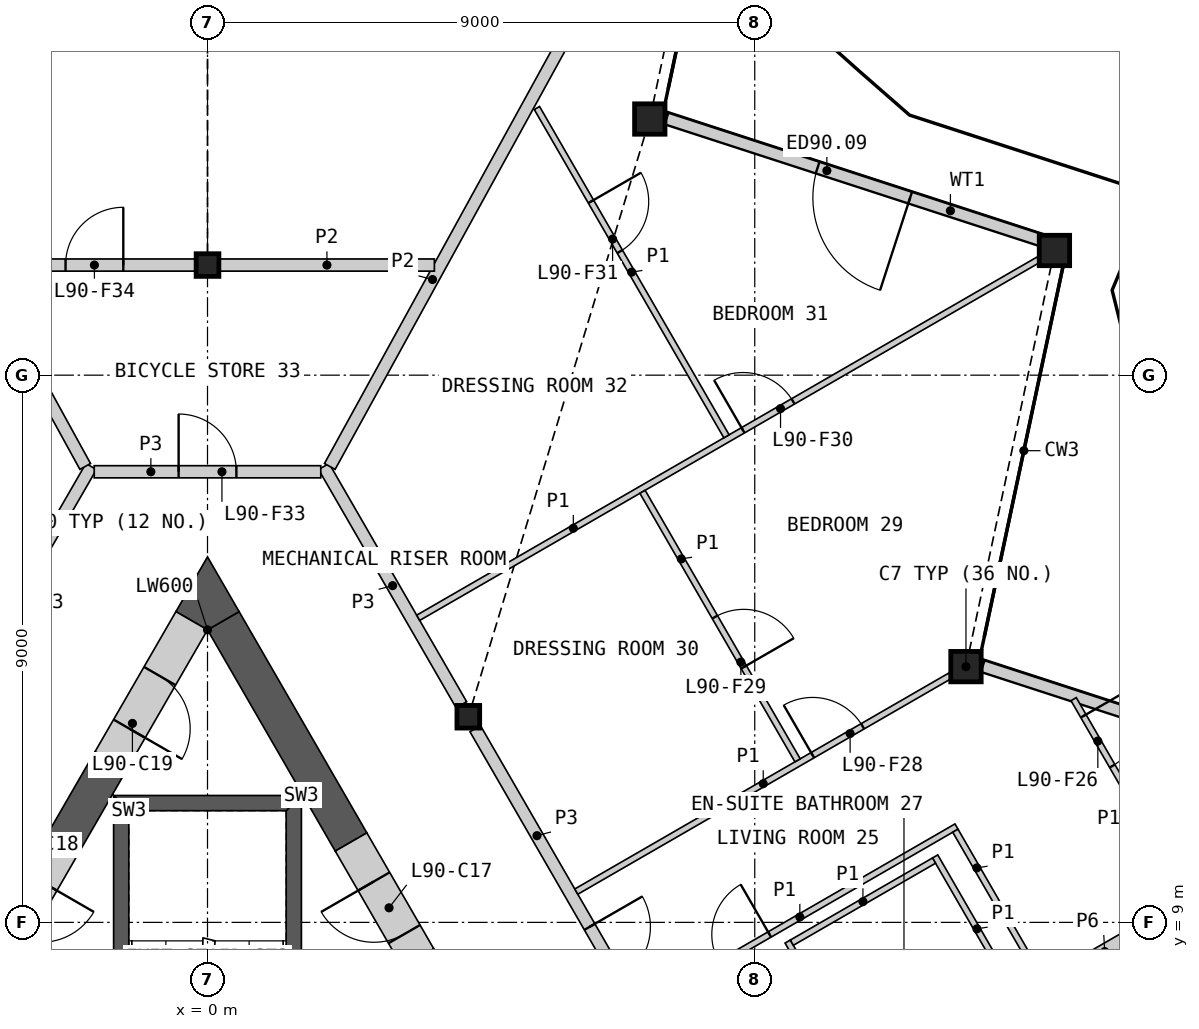
"""IFC4 building model, lengths in metres.
Left out: names, types, materials, properties, quantities, classifications, styles, units other than length and angle.
Written with IfcOpenShell. Run it as: python <this file> out.ifc"""

import sys

from ifc_helpers import new_model, si_unit, direction, frame, frame_2d, origin, origin_2d, place, context, subcontext, project, spatial, polyline, rectangle, hollow_rectangle, i_section, outline, extrude, element, fill, save


model = new_model("IFC4")
c1 = context("Model", 3, precision=1e-05, world=origin(), true_north=direction((0.0, 1.0)))
c2 = subcontext(c1, "Body", "Model", "MODEL_VIEW")
j1 = project(units=[si_unit("LENGTHUNIT", "METRE"), si_unit("PLANEANGLEUNIT", "RADIAN")], contexts=[c1])
p1 = place(None, origin())
s1 = spatial("IfcSite", under=j1, at=p1, CompositionType="ELEMENT")
p2 = place(p1, origin())
s2 = spatial("IfcBuilding", under=s1, at=p2, CompositionType="ELEMENT")
p3 = place(p2, frame((0.0, 0.0, 395.0)))
s3 = spatial("IfcBuildingStorey", under=s2, at=p3, CompositionType="ELEMENT", Elevation=395.0)
for number, where, z_axis, x_axis in (
    (1, (12.474, 13.206, 0.0), (0.0, 0.0, 1.0), (1.0, 0.0, 0.0)),
    (2, (13.929, 20.051, 0.0), (0.0, 0.0, 1.0), (1.0, 0.0, 0.0)),
    (3, (7.274, 22.213, 0.0), (0.0, 0.0, 1.0), (1.0, 0.0, 0.0)),
):
    element("IfcColumn", number, at=place(p3, frame(where, z_axis=z_axis, x_axis=x_axis)), inside=s3, PredefinedType="COLUMN", context=c2, shape_type="SweptSolid", body=[
        extrude(hollow_rectangle(XDim=0.5, YDim=0.5, WallThickness=0.03, at=origin_2d()), origin(), (0.0, 0.0, 1.0), 3.4),
    ])
for number, where, z_axis, x_axis in (
    (4, (0.0, 19.811, 0.0), (0.0, 0.0, 1.0), (1.0, 0.0, 0.0)),
    (5, (4.289, 12.382, 0.0), (0.0, 0.0, 1.0), (1.0, 0.0, 0.0)),
):
    element("IfcColumn", number, at=place(p3, frame(where, z_axis=z_axis, x_axis=x_axis)), inside=s3, PredefinedType="COLUMN", context=c2, shape_type="SweptSolid", body=[
        extrude(i_section(OverallWidth=0.374, OverallDepth=0.372, WebThickness=0.016, FlangeThickness=0.026, at=origin_2d()), origin(), (0.0, 0.0, 1.0), 3.4),
    ])
p4 = place(p3, frame((18.974, 11.191, 0.0), z_axis=(0.0, 0.0, 1.0), x_axis=(-0.951057912068, 0.309012698595, 0.0)))
e6 = element("IfcWall", 6, at=p4, inside=s3, PredefinedType="SOLIDWALL", context=c2, shape_type="SweptSolid", body=[
    extrude(rectangle(XDim=6.546, YDim=0.2, at=frame_2d((3.273, 0.0))), origin(), (0.0, 0.0, 1.0), 2.634),
])
p5 = place(p4, frame((2.333, 0.0, 0.0)))
e7 = element("IfcOpeningElement", 7, at=p5, cuts=e6, PredefinedType="OPENING", context=c2, shape_type="SweptSolid", body=[
    extrude(rectangle(XDim=1.6, YDim=2.25, at=frame_2d((0.8, 1.125))), frame((0.0, 0.11, 0.0), z_axis=(0.0, -1.0, 0.0), x_axis=(1.0, 0.0, 0.0)), (0.0, 0.0, 1.0), 0.22),
])
p6 = place(p3, frame((13.774, 20.198, 0.0), z_axis=(0.0, 0.0, 1.0), x_axis=(-0.951046950169, 0.309046434335, 0.0)))
e8 = element("IfcWall", 8, at=p6, inside=s3, PredefinedType="SOLIDWALL", context=c2, shape_type="SweptSolid", body=[
    extrude(rectangle(XDim=6.546, YDim=0.2, at=frame_2d((3.273, 0.0))), origin(), (0.0, 0.0, 1.0), 2.634),
])
p7 = place(p6, frame((2.333, 0.0, 0.0)))
e9 = element("IfcOpeningElement", 9, at=p7, cuts=e8, PredefinedType="OPENING", context=c2, shape_type="SweptSolid", body=[
    extrude(rectangle(XDim=1.6, YDim=2.25, at=frame_2d((0.8, 1.125))), frame((0.0, 0.11, 0.0), z_axis=(0.0, -1.0, 0.0), x_axis=(1.0, 0.0, 0.0)), (0.0, 0.0, 1.0), 0.22),
])
p8 = place(p3, origin())
e10 = element("IfcWall", 10, at=p8, inside=s3, PredefinedType="SHEAR", context=c2, shape_type="SweptSolid", body=[
    extrude(outline(polyline([(1.544, 5.237), (1.544, 11.087), (1.294, 10.837), (1.294, 5.237), (1.544, 5.237)])), origin(), (0.0, 0.0, 1.0), 3.1),
])
p9 = place(p3, origin())
e11 = element("IfcWall", 11, at=p9, inside=s3, PredefinedType="SHEAR", context=c2, shape_type="SweptSolid", body=[
    extrude(outline(polyline([(1.544, 11.087), (-1.544, 11.087), (-1.294, 10.837), (1.294, 10.837), (1.544, 11.087)])), origin(), (0.0, 0.0, 1.0), 3.1),
])
p10 = place(p3, origin())
e12 = element("IfcWall", 12, at=p10, inside=s3, PredefinedType="SHEAR", context=c2, shape_type="SweptSolid", body=[
    extrude(outline(polyline([(-1.294, 10.837), (-1.544, 11.087), (-1.544, 5.237), (-1.294, 5.237), (-1.294, 10.837)])), origin(), (0.0, 0.0, 1.0), 3.1),
])
p11 = place(p3, frame((8.686, -0.634, 0.0), z_axis=(0.0, 0.0, 1.0), x_axis=(-0.50001836461, 0.866014800712, 0.0)))
e13 = element("IfcWall", 13, at=p11, inside=s3, PredefinedType="SHEAR", context=c2, shape_type="SweptSolid", body=[
    extrude(rectangle(XDim=10.451, YDim=0.6, at=frame_2d((5.225, 0.0))), origin(), (0.0, 0.0, 1.0), 3.1),
])
p12 = place(p3, frame((2.361, 10.322, 0.0), z_axis=(0.0, 0.0, 1.0), x_axis=(-0.500000735859, 0.866024978935, 0.0)))
e14 = element("IfcWall", 14, at=p12, inside=s3, PredefinedType="SHEAR", context=c2, shape_type="SweptSolid", body=[
    extrude(rectangle(XDim=4.202, YDim=0.6, at=frame_2d((2.101, 0.0))), origin(), (0.0, 0.0, 1.0), 3.1),
])
p13 = place(p3, frame((-1.59, 11.658, 0.0), z_axis=(0.0, 0.0, 1.0), x_axis=(-0.500037594623, -0.866003697431, 0.0)))
e15 = element("IfcWall", 15, at=p13, inside=s3, PredefinedType="SHEAR", context=c2, shape_type="SweptSolid", body=[
    extrude(rectangle(XDim=1.542, YDim=0.6, at=frame_2d((0.771, 0.0))), origin(), (0.0, 0.0, 1.0), 3.1),
])
p14 = place(p3, origin())
e16 = element("IfcWall", 16, at=p14, inside=s3, PredefinedType="SHEAR", context=c2, shape_type="SweptSolid", body=[
    extrude(outline(polyline([(0.0, 13.811), (-0.52, 14.111), (0.0, 15.011), (0.52, 14.111), (0.0, 13.811)])), origin(), (0.0, 0.0, 1.0), 3.1),
])
p15 = place(p3, frame((3.461, 8.417, 0.0), z_axis=(0.0, 0.0, 1.0), x_axis=(-0.499946605688, 0.86605622881, 0.0)))
e17 = element("IfcWall", 17, at=p15, inside=s3, PredefinedType="SHEAR", context=c2, shape_type="SweptSolid", body=[
    extrude(rectangle(XDim=2.2, YDim=0.6, at=frame_2d((1.1, 0.0))), origin(), (0.0, 0.0, 1.0), 3.1),
])
p16 = place(p15, frame((0.45, 0.0, 0.0)))
e18 = element("IfcOpeningElement", 18, at=p16, cuts=e17, PredefinedType="OPENING", context=c2, shape_type="SweptSolid", body=[
    extrude(rectangle(XDim=1.0, YDim=2.1, at=frame_2d((0.5, 1.05))), frame((0.0, 0.31, 0.0), z_axis=(0.0, -1.0, 0.0), x_axis=(1.0, 0.0, 0.0)), (0.0, 0.0, 1.0), 0.62),
])
p17 = place(p3, frame((-2.361, 10.322, 0.0), z_axis=(0.0, 0.0, 1.0), x_axis=(-0.499946605688, -0.86605622881, 0.0)))
e19 = element("IfcWall", 19, at=p17, inside=s3, PredefinedType="SHEAR", context=c2, shape_type="SweptSolid", body=[
    extrude(rectangle(XDim=2.2, YDim=0.6, at=frame_2d((1.1, 0.0))), origin(), (0.0, 0.0, 1.0), 3.1),
])
p18 = place(p17, frame((0.75, 0.0, 0.0)))
e20 = element("IfcOpeningElement", 20, at=p18, cuts=e19, PredefinedType="OPENING", context=c2, shape_type="SweptSolid", body=[
    extrude(rectangle(XDim=1.0, YDim=2.1, at=frame_2d((0.5, 1.05))), frame((0.0, 0.31, 0.0), z_axis=(0.0, -1.0, 0.0), x_axis=(1.0, 0.0, 0.0)), (0.0, 0.0, 1.0), 0.62),
])
p19 = place(p3, frame((-0.26, 13.961, 0.0), z_axis=(0.0, 0.0, 1.0), x_axis=(-0.49997936161, -0.866037319036, 0.0)))
e21 = element("IfcWall", 21, at=p19, inside=s3, PredefinedType="SHEAR", context=c2, shape_type="SweptSolid", body=[
    extrude(rectangle(XDim=2.66, YDim=0.6, at=frame_2d((1.33, 0.0))), origin(), (0.0, 0.0, 1.0), 3.1),
])
p20 = place(p19, frame((1.05, 0.0, 0.0)))
e22 = element("IfcOpeningElement", 22, at=p20, cuts=e21, PredefinedType="OPENING", context=c2, shape_type="SweptSolid", body=[
    extrude(rectangle(XDim=1.0, YDim=2.1, at=frame_2d((0.5, 1.05))), frame((0.0, 0.31, 0.0), z_axis=(0.0, -1.0, 0.0), x_axis=(1.0, 0.0, 0.0)), (0.0, 0.0, 1.0), 0.62),
])
p21 = place(p3, frame((4.403, 12.185, 0.0), z_axis=(0.0, 0.0, 1.0), x_axis=(0.499992155518, -0.866029932751, 0.0)))
e23 = element("IfcWall", 23, at=p21, inside=s3, PredefinedType="PARTITIONING", context=c2, shape_type="SweptSolid", body=[
    extrude(rectangle(XDim=8.123, YDim=0.2, at=frame_2d((4.062, 0.0))), origin(), (0.0, 0.0, 1.0), 3.1),
])
p22 = place(p21, frame((3.762, 0.0, 0.0)))
e24 = element("IfcOpeningElement", 24, at=p22, cuts=e23, PredefinedType="OPENING", context=c2, shape_type="SweptSolid", body=[
    extrude(rectangle(XDim=1.0, YDim=2.1, at=frame_2d((0.5, 1.05))), frame((0.0, 0.11, 0.0), z_axis=(0.0, -1.0, 0.0), x_axis=(1.0, 0.0, 0.0)), (0.0, 0.0, 1.0), 0.22),
])
p23 = place(p3, frame((13.385, 7.728, 0.0), z_axis=(0.0, 0.0, 1.0), x_axis=(0.866023139795, 0.500003921324, 0.0)))
e25 = element("IfcWall", 25, at=p23, inside=s3, PredefinedType="PARTITIONING", context=c2, shape_type="SweptSolid", body=[
    extrude(rectangle(XDim=6.332, YDim=0.25, at=frame_2d((3.166, 0.0))), origin(), (0.0, 0.0, 1.0), 2.33),
])
for number, where, z_axis, x_axis in (
    (26, (-4.176, 12.579, 0.0), (0.0, 0.0, 1.0), (0.5, 0.866, 0.0)),
    (27, (1.913, 16.498, 0.0), (0.0, 0.0, 1.0), (0.5, -0.866, 0.0)),
):
    element("IfcWall", number, at=place(p3, frame(where, z_axis=z_axis, x_axis=x_axis)), inside=s3, PredefinedType="PARTITIONING", context=c2, shape_type="SweptSolid", body=[
        extrude(rectangle(XDim=4.525, YDim=0.2, at=frame_2d((2.263, 0.0))), origin(), (0.0, 0.0, 1.0), 3.1),
    ])
p24 = place(p3, frame((-1.863, 16.411, 0.0), z_axis=(0.0, 0.0, 1.0), x_axis=(1.0, 0.0, 0.0)))
e28 = element("IfcWall", 28, at=p24, inside=s3, PredefinedType="PARTITIONING", context=c2, shape_type="SweptSolid", body=[
    extrude(rectangle(XDim=3.726, YDim=0.2, at=frame_2d((1.863, 0.0))), origin(), (0.0, 0.0, 1.0), 3.1),
])
p25 = place(p24, frame((1.388, 0.0, 0.0)))
e29 = element("IfcOpeningElement", 29, at=p25, cuts=e28, PredefinedType="OPENING", context=c2, shape_type="SweptSolid", body=[
    extrude(rectangle(XDim=0.95, YDim=2.1, at=frame_2d((0.475, 1.05))), frame((0.0, 0.11, 0.0), z_axis=(0.0, -1.0, 0.0), x_axis=(1.0, 0.0, 0.0)), (0.0, 0.0, 1.0), 0.22),
])
p26 = place(p3, frame((-8.581, 28.455, 0.0), z_axis=(0.0, 0.0, 1.0), x_axis=(0.481551865547, -0.876417594979, 0.0)))
e30 = element("IfcWall", 30, at=p26, inside=s3, PredefinedType="PARTITIONING", context=c2, shape_type="SweptSolid", body=[
    extrude(rectangle(XDim=13.643, YDim=0.2, at=frame_2d((6.821, 0.0))), origin(), (0.0, 0.0, 1.0), 2.33),
])
p27 = place(p3, frame((2.011, 16.499, 0.0), z_axis=(0.0, 0.0, 1.0), x_axis=(0.481548701843, 0.876419333284, 0.0)))
e31 = element("IfcWall", 31, at=p27, inside=s3, PredefinedType="PARTITIONING", context=c2, shape_type="SweptSolid", body=[
    extrude(rectangle(XDim=14.032, YDim=0.2, at=frame_2d((7.016, 0.0))), origin(), (0.0, 0.0, 1.0), 2.33),
])
p28 = place(p3, frame((0.197, 19.811, 0.0), z_axis=(0.0, 0.0, 1.0), x_axis=(1.0, 0.0, 0.0)))
e32 = element("IfcWall", 32, at=p28, inside=s3, PredefinedType="PARTITIONING", context=c2, shape_type="SweptSolid", body=[
    extrude(rectangle(XDim=3.534, YDim=0.2, at=frame_2d((1.767, 0.0))), origin(), (0.0, 0.0, 1.0), 2.33),
])
p29 = place(p3, frame((-3.731, 19.811, 0.0), z_axis=(0.0, 0.0, 1.0), x_axis=(1.0, 0.0, 0.0)))
e33 = element("IfcWall", 33, at=p29, inside=s3, PredefinedType="PARTITIONING", context=c2, shape_type="SweptSolid", body=[
    extrude(rectangle(XDim=3.534, YDim=0.2, at=frame_2d((1.767, 0.0))), origin(), (0.0, 0.0, 1.0), 2.33),
])
p30 = place(p29, frame((1.396, 0.0, 0.0)))
e34 = element("IfcOpeningElement", 34, at=p30, cuts=e33, PredefinedType="OPENING", context=c2, shape_type="SweptSolid", body=[
    extrude(rectangle(XDim=0.95, YDim=2.1, at=frame_2d((0.475, 1.05))), frame((0.0, 0.11, 0.0), z_axis=(0.0, -1.0, 0.0), x_axis=(1.0, 0.0, 0.0)), (0.0, 0.0, 1.0), 0.22),
])
p31 = place(p3, frame((3.465, 14.01, 0.0), z_axis=(0.0, 0.0, 1.0), x_axis=(0.866032376801, 0.499987922186, 0.0)))
e35 = element("IfcWall", 35, at=p31, inside=s3, PredefinedType="PARTITIONING", context=c2, shape_type="SweptSolid", body=[
    extrude(rectangle(XDim=11.782, YDim=0.1, at=frame_2d((5.891, 0.0))), origin(), (0.0, 0.0, 1.0), 2.33),
])
p32 = place(p31, frame((6.168, 0.0, 0.0)))
e36 = element("IfcOpeningElement", 36, at=p32, cuts=e35, PredefinedType="OPENING", context=c2, shape_type="SweptSolid", body=[
    extrude(rectangle(XDim=0.95, YDim=2.1, at=frame_2d((0.475, 1.05))), frame((0.0, 0.06, 0.0), z_axis=(0.0, -1.0, 0.0), x_axis=(1.0, 0.0, 0.0)), (0.0, 0.0, 1.0), 0.12),
])
p33 = place(p3, frame((6.065, 9.506, 0.0), z_axis=(0.0, 0.0, 1.0), x_axis=(0.866018949465, 0.500011179042, 0.0)))
e37 = element("IfcWall", 37, at=p33, inside=s3, PredefinedType="PARTITIONING", context=c2, shape_type="SweptSolid", body=[
    extrude(rectangle(XDim=7.1, YDim=0.1, at=frame_2d((3.55, 0.0))), origin(), (0.0, 0.0, 1.0), 2.33),
])
p34 = place(p33, frame((4.488, 0.0, 0.0)))
e38 = element("IfcOpeningElement", 38, at=p34, cuts=e37, PredefinedType="OPENING", context=c2, shape_type="SweptSolid", body=[
    extrude(rectangle(XDim=0.95, YDim=2.1, at=frame_2d((0.475, 1.05))), frame((0.0, 0.06, 0.0), z_axis=(0.0, -1.0, 0.0), x_axis=(1.0, 0.0, 0.0)), (0.0, 0.0, 1.0), 0.12),
])
p35 = place(p3, frame((5.417, 22.394, 0.0), z_axis=(0.0, 0.0, 1.0), x_axis=(0.499975529996, -0.866039531087, 0.0)))
e39 = element("IfcWall", 39, at=p35, inside=s3, PredefinedType="PARTITIONING", context=c2, shape_type="SweptSolid", body=[
    extrude(rectangle(XDim=6.235, YDim=0.1, at=frame_2d((3.118, 0.0))), origin(), (0.0, 0.0, 1.0), 2.33),
])
p36 = place(p35, frame((1.777, 0.0, 0.0)))
e40 = element("IfcOpeningElement", 40, at=p36, cuts=e39, PredefinedType="OPENING", context=c2, shape_type="SweptSolid", body=[
    extrude(rectangle(XDim=0.95, YDim=2.1, at=frame_2d((0.475, 1.05))), frame((0.0, 0.06, 0.0), z_axis=(0.0, -1.0, 0.0), x_axis=(1.0, 0.0, 0.0)), (0.0, 0.0, 1.0), 0.12),
])
p37 = place(p3, frame((7.165, 7.601, 0.0), z_axis=(0.0, 0.0, 1.0), x_axis=(0.866017493347, 0.500013701029, 0.0)))
e41 = element("IfcWall", 41, at=p37, inside=s3, PredefinedType="PARTITIONING", context=c2, shape_type="SweptSolid", body=[
    extrude(rectangle(XDim=5.95, YDim=0.1, at=frame_2d((2.975, 0.0))), origin(), (0.0, 0.0, 1.0), 2.33),
])
p38 = place(p37, frame((1.45, 0.0, 0.0)))
e42 = element("IfcOpeningElement", 42, at=p38, cuts=e41, PredefinedType="OPENING", context=c2, shape_type="SweptSolid", body=[
    extrude(rectangle(XDim=0.95, YDim=2.1, at=frame_2d((0.475, 1.05))), frame((0.0, 0.06, 0.0), z_axis=(0.0, -1.0, 0.0), x_axis=(1.0, 0.0, 0.0)), (0.0, 0.0, 1.0), 0.12),
])
p39 = place(p3, frame((11.967, 10.084, 0.0), z_axis=(0.0, 0.0, 1.0), x_axis=(0.500015767406, -0.866016300277, 0.0)))
e43 = element("IfcWall", 43, at=p39, inside=s3, PredefinedType="PARTITIONING", context=c2, shape_type="SweptSolid", body=[
    extrude(rectangle(XDim=5.5, YDim=0.1, at=frame_2d((2.75, 0.0))), origin(), (0.0, 0.0, 1.0), 2.33),
])
p40 = place(p3, frame((9.542, 8.684, 0.0), z_axis=(0.0, 0.0, 1.0), x_axis=(0.499996545922, -0.866027397988, 0.0)))
e44 = element("IfcWall", 44, at=p40, inside=s3, PredefinedType="PARTITIONING", context=c2, shape_type="SweptSolid", body=[
    extrude(rectangle(XDim=5.5, YDim=0.1, at=frame_2d((2.75, 0.0))), origin(), (0.0, 0.0, 1.0), 2.33),
])
p41 = place(p40, frame((0.756, 0.0, 0.0)))
e45 = element("IfcOpeningElement", 45, at=p41, cuts=e44, PredefinedType="OPENING", context=c2, shape_type="SweptSolid", body=[
    extrude(rectangle(XDim=0.95, YDim=2.1, at=frame_2d((0.475, 1.05))), frame((0.0, 0.06, 0.0), z_axis=(0.0, -1.0, 0.0), x_axis=(1.0, 0.0, 0.0)), (0.0, 0.0, 1.0), 0.12),
])
p42 = place(p3, frame((7.154, 16.082, 0.0), z_axis=(0.0, 0.0, 1.0), x_axis=(0.499984882974, -0.866034131428, 0.0)))
e46 = element("IfcWall", 46, at=p42, inside=s3, PredefinedType="PARTITIONING", context=c2, shape_type="SweptSolid", body=[
    extrude(rectangle(XDim=5.1, YDim=0.1, at=frame_2d((2.55, 0.0))), origin(), (0.0, 0.0, 1.0), 2.33),
])
p43 = place(p42, frame((2.379, 0.0, 0.0)))
e47 = element("IfcOpeningElement", 47, at=p43, cuts=e46, PredefinedType="OPENING", context=c2, shape_type="SweptSolid", body=[
    extrude(rectangle(XDim=0.95, YDim=2.1, at=frame_2d((0.475, 1.05))), frame((0.0, 0.06, 0.0), z_axis=(0.0, -1.0, 0.0), x_axis=(1.0, 0.0, 0.0)), (0.0, 0.0, 1.0), 0.12),
])
p44 = place(p3, frame((14.244, 12.672, 0.0), z_axis=(0.0, 0.0, 1.0), x_axis=(0.500021098671, -0.866013222118, 0.0)))
e48 = element("IfcWall", 48, at=p44, inside=s3, PredefinedType="PARTITIONING", context=c2, shape_type="SweptSolid", body=[
    extrude(rectangle(XDim=3.727, YDim=0.1, at=frame_2d((1.863, 0.0))), origin(), (0.0, 0.0, 1.0), 2.33),
])
p45 = place(p44, frame((0.321, 0.0, 0.0)))
e49 = element("IfcOpeningElement", 49, at=p45, cuts=e48, PredefinedType="OPENING", context=c2, shape_type="SweptSolid", body=[
    extrude(rectangle(XDim=0.95, YDim=2.1, at=frame_2d((0.475, 1.05))), frame((0.0, 0.06, 0.0), z_axis=(0.0, -1.0, 0.0), x_axis=(1.0, 0.0, 0.0)), (0.0, 0.0, 1.0), 0.12),
])
p46 = place(p3, frame((12.3, 10.508, 0.0), z_axis=(0.0, 0.0, 1.0), x_axis=(0.500024172624, -0.866011447264, 0.0)))
e50 = element("IfcWall", 50, at=p46, inside=s3, PredefinedType="PARTITIONING", context=c2, shape_type="SweptSolid", body=[
    extrude(rectangle(XDim=2.825, YDim=0.1, at=frame_2d((1.413, 0.0))), origin(), (0.0, 0.0, 1.0), 2.33),
])
p47 = place(p3, frame((9.61, 8.666, 0.0), z_axis=(0.0, 0.0, 1.0), x_axis=(0.86599734893, 0.500048589285, 0.0)))
e51 = element("IfcWall", 51, at=p47, inside=s3, PredefinedType="PARTITIONING", context=c2, shape_type="SweptSolid", body=[
    extrude(rectangle(XDim=2.7, YDim=0.1, at=frame_2d((1.35, 0.0))), origin(), (0.0, 0.0, 1.0), 2.33),
])
p48 = place(p7, origin())
e52 = element("IfcDoor", 52, at=p48, inside=s3, OperationType="DOUBLE_DOOR_SINGLE_SWING", PredefinedType="DOOR", context=c2, shape_type="SweptSolid", body=[
    extrude(rectangle(XDim=1.6, YDim=2.25, at=frame_2d((0.8, 1.125))), frame((0.0, 0.025, 0.0), z_axis=(0.0, -1.0, 0.0), x_axis=(1.0, 0.0, 0.0)), (0.0, 0.0, 1.0), 0.05),
])
fill(e9, e52)
p49 = place(p16, origin())
e53 = element("IfcDoor", 53, at=p49, inside=s3, OperationType="SINGLE_SWING_RIGHT", PredefinedType="DOOR", context=c2, shape_type="SweptSolid", body=[
    extrude(rectangle(XDim=1.0, YDim=2.1, at=frame_2d((0.5, 1.05))), frame((0.0, 0.055, 0.0), z_axis=(0.0, -1.0, 0.0), x_axis=(1.0, 0.0, 0.0)), (0.0, 0.0, 1.0), 0.05),
])
fill(e18, e53)
p50 = place(p20, origin())
e54 = element("IfcDoor", 54, at=p50, inside=s3, OperationType="SINGLE_SWING_RIGHT", PredefinedType="DOOR", context=c2, shape_type="SweptSolid", body=[
    extrude(rectangle(XDim=1.0, YDim=2.1, at=frame_2d((0.5, 1.05))), frame((0.0, 0.055, 0.0), z_axis=(0.0, -1.0, 0.0), x_axis=(1.0, 0.0, 0.0)), (0.0, 0.0, 1.0), 0.05),
])
fill(e22, e54)
p51 = place(p22, origin())
e55 = element("IfcDoor", 55, at=p51, inside=s3, OperationType="SINGLE_SWING_LEFT", PredefinedType="DOOR", context=c2, shape_type="SweptSolid", body=[
    extrude(rectangle(XDim=1.0, YDim=2.1, at=frame_2d((0.5, 1.05))), frame((0.0, 0.025, 0.0), z_axis=(0.0, -1.0, 0.0), x_axis=(1.0, 0.0, 0.0)), (0.0, 0.0, 1.0), 0.05),
])
fill(e24, e55)
p52 = place(p45, origin())
e56 = element("IfcDoor", 56, at=p52, inside=s3, OperationType="SINGLE_SWING_LEFT", PredefinedType="DOOR", context=c2, shape_type="SweptSolid", body=[
    extrude(rectangle(XDim=0.95, YDim=2.1, at=frame_2d((0.475, 1.05))), frame((0.0, 0.025, 0.0), z_axis=(0.0, -1.0, 0.0), x_axis=(1.0, 0.0, 0.0)), (0.0, 0.0, 1.0), 0.05),
])
fill(e49, e56)
p53 = place(p38, origin())
e57 = element("IfcDoor", 57, at=p53, inside=s3, OperationType="SINGLE_SWING_RIGHT", PredefinedType="DOOR", context=c2, shape_type="SweptSolid", body=[
    extrude(rectangle(XDim=0.95, YDim=2.1, at=frame_2d((0.475, 1.05))), frame((0.0, 0.025, 0.0), z_axis=(0.0, -1.0, 0.0), x_axis=(1.0, 0.0, 0.0)), (0.0, 0.0, 1.0), 0.05),
])
fill(e42, e57)
p54 = place(p34, origin())
e58 = element("IfcDoor", 58, at=p54, inside=s3, OperationType="SINGLE_SWING_LEFT", PredefinedType="DOOR", context=c2, shape_type="SweptSolid", body=[
    extrude(rectangle(XDim=0.95, YDim=2.1, at=frame_2d((0.475, 1.05))), frame((0.0, 0.025, 0.0), z_axis=(0.0, -1.0, 0.0), x_axis=(1.0, 0.0, 0.0)), (0.0, 0.0, 1.0), 0.05),
])
fill(e38, e58)
p55 = place(p43, origin())
e59 = element("IfcDoor", 59, at=p55, inside=s3, OperationType="SINGLE_SWING_RIGHT", PredefinedType="DOOR", context=c2, shape_type="SweptSolid", body=[
    extrude(rectangle(XDim=0.95, YDim=2.1, at=frame_2d((0.475, 1.05))), frame((0.0, 0.025, 0.0), z_axis=(0.0, -1.0, 0.0), x_axis=(1.0, 0.0, 0.0)), (0.0, 0.0, 1.0), 0.05),
])
fill(e47, e59)
p56 = place(p32, origin())
e60 = element("IfcDoor", 60, at=p56, inside=s3, OperationType="SINGLE_SWING_LEFT", PredefinedType="DOOR", context=c2, shape_type="SweptSolid", body=[
    extrude(rectangle(XDim=0.95, YDim=2.1, at=frame_2d((0.475, 1.05))), frame((0.0, 0.025, 0.0), z_axis=(0.0, -1.0, 0.0), x_axis=(1.0, 0.0, 0.0)), (0.0, 0.0, 1.0), 0.05),
])
fill(e36, e60)
p57 = place(p36, origin())
e61 = element("IfcDoor", 61, at=p57, inside=s3, OperationType="SINGLE_SWING_LEFT", PredefinedType="DOOR", context=c2, shape_type="SweptSolid", body=[
    extrude(rectangle(XDim=0.95, YDim=2.1, at=frame_2d((0.475, 1.05))), frame((0.0, 0.025, 0.0), z_axis=(0.0, -1.0, 0.0), x_axis=(1.0, 0.0, 0.0)), (0.0, 0.0, 1.0), 0.05),
])
fill(e40, e61)
p58 = place(p25, origin())
e62 = element("IfcDoor", 62, at=p58, inside=s3, OperationType="SINGLE_SWING_LEFT", PredefinedType="DOOR", context=c2, shape_type="SweptSolid", body=[
    extrude(rectangle(XDim=0.95, YDim=2.1, at=frame_2d((0.475, 1.05))), frame((0.0, 0.025, 0.0), z_axis=(0.0, -1.0, 0.0), x_axis=(1.0, 0.0, 0.0)), (0.0, 0.0, 1.0), 0.05),
])
fill(e29, e62)
p59 = place(p30, origin())
e63 = element("IfcDoor", 63, at=p59, inside=s3, OperationType="SINGLE_SWING_RIGHT", PredefinedType="DOOR", context=c2, shape_type="SweptSolid", body=[
    extrude(rectangle(XDim=0.95, YDim=2.1, at=frame_2d((0.475, 1.05))), frame((0.0, 0.025, 0.0), z_axis=(0.0, -1.0, 0.0), x_axis=(1.0, 0.0, 0.0)), (0.0, 0.0, 1.0), 0.05),
])
fill(e34, e63)
save(model, sys.argv[1])
